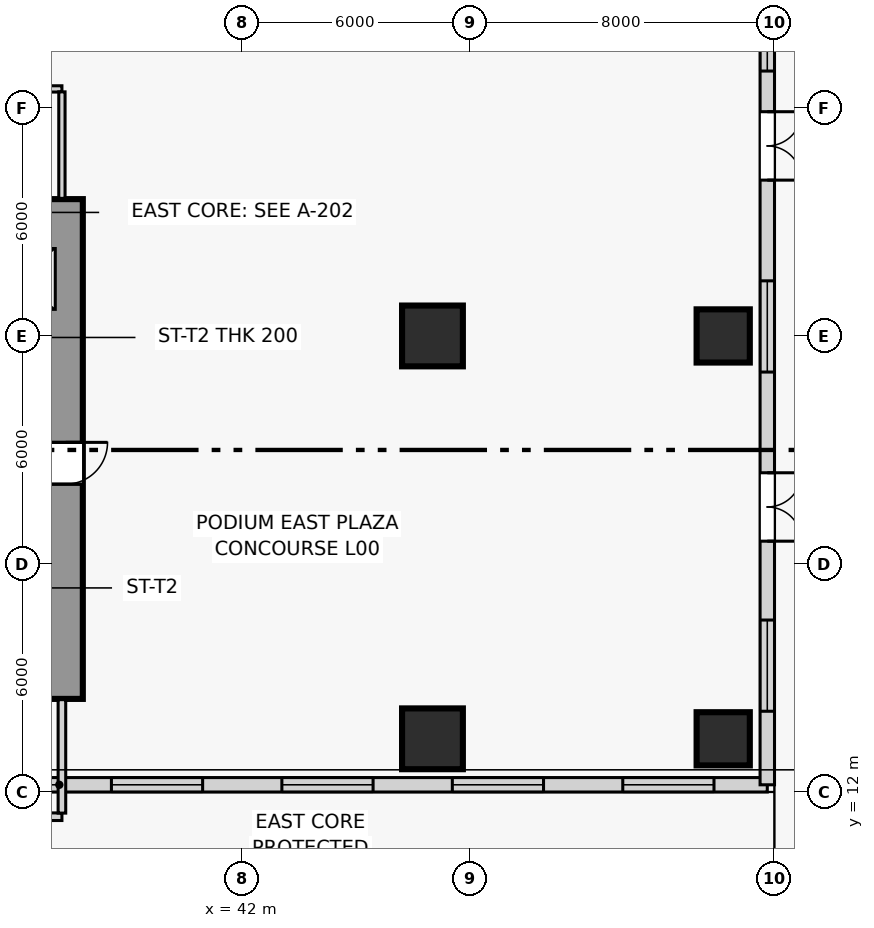
"""IFC4 building model, lengths in metres.
Left out: names, types, materials, properties, quantities, classifications, styles, units other than length and angle.
Written with IfcOpenShell. Run it as: python <this file> out.ifc"""

import sys

from ifc_helpers import new_model, si_unit, direction, frame, frame_2d, origin, origin_2d, place, context, subcontext, project, spatial, rectangle, extrude, source, transform, mapped, element, fill, save


model = new_model("IFC4")
c1 = context("Model", 3, precision=1e-05, world=origin(), true_north=direction((0.0, 1.0)))
c2 = subcontext(c1, "Body", "Model", "MODEL_VIEW")
j1 = project(units=[si_unit("LENGTHUNIT", "METRE"), si_unit("PLANEANGLEUNIT", "RADIAN")], contexts=[c1])
p1 = place(None, origin())
s1 = spatial("IfcSite", under=j1, at=p1, CompositionType="ELEMENT")
p2 = place(p1, origin())
s2 = spatial("IfcBuilding", under=s1, at=p2, CompositionType="ELEMENT")
p3 = place(p2, origin())
s3 = spatial("IfcBuildingStorey", under=s2, at=p3, CompositionType="ELEMENT", Elevation=0.0)
p4 = place(p3, frame((37.35, 14.45, 0.0), z_axis=(0.0, 0.0, 1.0), x_axis=(0.0, 1.0, 0.0)))
e1 = element("IfcWall", 1, at=p4, inside=s3, PredefinedType="SHEAR", context=c2, shape_type="SweptSolid", body=[
    extrude(rectangle(XDim=13.15, YDim=0.9, at=frame_2d((6.575, 0.0))), origin(), (0.0, 0.0, 1.0), 4.5),
])
p5 = place(p4, frame((5.65, 0.0, 0.0)))
e2 = element("IfcOpeningElement", 2, at=p5, cuts=e1, PredefinedType="OPENING", context=c2, shape_type="SweptSolid", body=[
    extrude(rectangle(XDim=1.1, YDim=2.2, at=frame_2d((0.55, 1.1))), frame((0.0, 0.46, 0.0), z_axis=(0.0, -1.0, 0.0), x_axis=(1.0, 0.0, 0.0)), (0.0, 0.0, 1.0), 0.92),
])
m1 = source(origin(), c2, "Body", "SweptSolid", [
    extrude(rectangle(XDim=1.6, YDim=1.6, at=origin_2d()), origin(), (0.0, 0.0, 1.0), 4.5),
])
for number, where, z_axis, x_axis in (
    (3, (47.0, 13.4, 0.0), (0.0, 0.0, 1.0), (1.0, 0.0, 0.0)),
    (4, (47.0, 24.0, 0.0), (0.0, 0.0, 1.0), (1.0, 0.0, 0.0)),
):
    element("IfcColumn", number, at=place(p3, frame(where, z_axis=z_axis, x_axis=x_axis)), inside=s3, PredefinedType="COLUMN", context=c2, shape_type="MappedRepresentation", body=[
        mapped(m1, transform((0.0, 0.0, 0.0), scale=1.0)),
    ])
m2 = source(origin(), c2, "Body", "SweptSolid", [
    extrude(rectangle(XDim=1.4, YDim=1.4, at=origin_2d()), origin(), (0.0, 0.0, 1.0), 4.5),
])
for number, where, z_axis, x_axis in (
    (5, (54.65, 13.4, 0.0), (0.0, 0.0, 1.0), (1.0, 0.0, 0.0)),
    (6, (54.65, 24.0, 0.0), (0.0, 0.0, 1.0), (1.0, 0.0, 0.0)),
):
    element("IfcColumn", number, at=place(p3, frame(where, z_axis=z_axis, x_axis=x_axis)), inside=s3, PredefinedType="COLUMN", context=c2, shape_type="MappedRepresentation", body=[
        mapped(m2, transform((0.0, 0.0, 0.0), scale=1.0)),
    ])
p6 = place(p3, frame((35.81, 12.19, 0.0), z_axis=(0.0, 0.0, 1.0), x_axis=(1.0, 0.0, 0.0)))
e7 = element("IfcWall", 7, at=p6, inside=s3, PredefinedType="SOLIDWALL", context=c2, shape_type="SweptSolid", body=[
    extrude(rectangle(XDim=20.0, YDim=0.38, at=frame_2d((10.0, 0.0))), origin(), (0.0, 0.0, 1.0), 4.16),
])
p7 = place(p6, frame((2.742, 0.0, 0.8)))
e8 = element("IfcOpeningElement", 8, at=p7, cuts=e7, PredefinedType="OPENING", context=c2, shape_type="SweptSolid", body=[
    extrude(rectangle(XDim=2.4, YDim=2.1, at=frame_2d((1.2, 1.05))), frame((0.0, 0.2, 0.0), z_axis=(0.0, -1.0, 0.0), x_axis=(1.0, 0.0, 0.0)), (0.0, 0.0, 1.0), 0.4),
])
p8 = place(p6, frame((7.228, 0.0, 0.8)))
e9 = element("IfcOpeningElement", 9, at=p8, cuts=e7, PredefinedType="OPENING", context=c2, shape_type="SweptSolid", body=[
    extrude(rectangle(XDim=2.4, YDim=2.1, at=frame_2d((1.2, 1.05))), frame((0.0, 0.2, 0.0), z_axis=(0.0, -1.0, 0.0), x_axis=(1.0, 0.0, 0.0)), (0.0, 0.0, 1.0), 0.4),
])
p9 = place(p6, frame((11.712, 0.0, 0.8)))
e10 = element("IfcOpeningElement", 10, at=p9, cuts=e7, PredefinedType="OPENING", context=c2, shape_type="SweptSolid", body=[
    extrude(rectangle(XDim=2.4, YDim=2.1, at=frame_2d((1.2, 1.05))), frame((0.0, 0.2, 0.0), z_axis=(0.0, -1.0, 0.0), x_axis=(1.0, 0.0, 0.0)), (0.0, 0.0, 1.0), 0.4),
])
p10 = place(p6, frame((16.198, 0.0, 0.8)))
e11 = element("IfcOpeningElement", 11, at=p10, cuts=e7, PredefinedType="OPENING", context=c2, shape_type="SweptSolid", body=[
    extrude(rectangle(XDim=2.4, YDim=2.1, at=frame_2d((1.2, 1.05))), frame((0.0, 0.2, 0.0), z_axis=(0.0, -1.0, 0.0), x_axis=(1.0, 0.0, 0.0)), (0.0, 0.0, 1.0), 0.4),
])
p11 = place(p3, frame((55.81, 12.19, 0.0), z_axis=(0.0, 0.0, 1.0), x_axis=(0.0, 1.0, 0.0)))
e12 = element("IfcWall", 12, at=p11, inside=s3, PredefinedType="SOLIDWALL", context=c2, shape_type="SweptSolid", body=[
    extrude(rectangle(XDim=35.62, YDim=0.38, at=frame_2d((17.81, 0.0))), origin(), (0.0, 0.0, 1.0), 4.16),
])
p12 = place(p11, frame((1.935, 0.0, 0.8)))
e13 = element("IfcOpeningElement", 13, at=p12, cuts=e12, PredefinedType="OPENING", context=c2, shape_type="SweptSolid", body=[
    extrude(rectangle(XDim=2.4, YDim=2.1, at=frame_2d((1.2, 1.05))), frame((0.0, 0.2, 0.0), z_axis=(0.0, -1.0, 0.0), x_axis=(1.0, 0.0, 0.0)), (0.0, 0.0, 1.0), 0.4),
])
p13 = place(p11, frame((10.86, 0.0, 0.8)))
e14 = element("IfcOpeningElement", 14, at=p13, cuts=e12, PredefinedType="OPENING", context=c2, shape_type="SweptSolid", body=[
    extrude(rectangle(XDim=2.4, YDim=2.1, at=frame_2d((1.2, 1.05))), frame((0.0, 0.2, 0.0), z_axis=(0.0, -1.0, 0.0), x_axis=(1.0, 0.0, 0.0)), (0.0, 0.0, 1.0), 0.4),
])
p14 = place(p11, frame((18.78, 0.0, 0.8)))
e15 = element("IfcOpeningElement", 15, at=p14, cuts=e12, PredefinedType="OPENING", context=c2, shape_type="SweptSolid", body=[
    extrude(rectangle(XDim=2.4, YDim=2.1, at=frame_2d((1.2, 1.05))), frame((0.0, 0.2, 0.0), z_axis=(0.0, -1.0, 0.0), x_axis=(1.0, 0.0, 0.0)), (0.0, 0.0, 1.0), 0.4),
])
p15 = place(p11, frame((23.235, 0.0, 0.8)))
e16 = element("IfcOpeningElement", 16, at=p15, cuts=e12, PredefinedType="OPENING", context=c2, shape_type="SweptSolid", body=[
    extrude(rectangle(XDim=2.4, YDim=2.1, at=frame_2d((1.2, 1.05))), frame((0.0, 0.2, 0.0), z_axis=(0.0, -1.0, 0.0), x_axis=(1.0, 0.0, 0.0)), (0.0, 0.0, 1.0), 0.4),
])
p16 = place(p11, frame((27.565, 0.0, 0.8)))
e17 = element("IfcOpeningElement", 17, at=p16, cuts=e12, PredefinedType="OPENING", context=c2, shape_type="SweptSolid", body=[
    extrude(rectangle(XDim=2.4, YDim=2.1, at=frame_2d((1.2, 1.05))), frame((0.0, 0.2, 0.0), z_axis=(0.0, -1.0, 0.0), x_axis=(1.0, 0.0, 0.0)), (0.0, 0.0, 1.0), 0.4),
])
p17 = place(p11, frame((31.895, 0.0, 0.8)))
e18 = element("IfcOpeningElement", 18, at=p17, cuts=e12, PredefinedType="OPENING", context=c2, shape_type="SweptSolid", body=[
    extrude(rectangle(XDim=2.4, YDim=2.1, at=frame_2d((1.2, 1.05))), frame((0.0, 0.2, 0.0), z_axis=(0.0, -1.0, 0.0), x_axis=(1.0, 0.0, 0.0)), (0.0, 0.0, 1.0), 0.4),
])
p18 = place(p11, frame((6.41, 0.0, 0.0)))
e19 = element("IfcOpeningElement", 19, at=p18, cuts=e12, PredefinedType="OPENING", context=c2, shape_type="SweptSolid", body=[
    extrude(rectangle(XDim=1.8, YDim=2.4, at=frame_2d((0.9, 1.2))), frame((0.0, 0.2, 0.0), z_axis=(0.0, -1.0, 0.0), x_axis=(1.0, 0.0, 0.0)), (0.0, 0.0, 1.0), 0.4),
])
p19 = place(p11, frame((15.91, 0.0, 0.0)))
e20 = element("IfcOpeningElement", 20, at=p19, cuts=e12, PredefinedType="OPENING", context=c2, shape_type="SweptSolid", body=[
    extrude(rectangle(XDim=1.8, YDim=2.4, at=frame_2d((0.9, 1.2))), frame((0.0, 0.2, 0.0), z_axis=(0.0, -1.0, 0.0), x_axis=(1.0, 0.0, 0.0)), (0.0, 0.0, 1.0), 0.4),
])
p20 = place(p3, frame((31.05, 11.35, 0.0), z_axis=(0.0, 0.0, 1.0), x_axis=(1.0, 0.0, 0.0)))
e21 = element("IfcWall", 21, at=p20, inside=s3, PredefinedType="PARTITIONING", context=c2, shape_type="SweptSolid", body=[
    extrude(rectangle(XDim=6.2, YDim=0.2, at=frame_2d((3.1, 0.0))), origin(), (0.0, 0.0, 1.0), 4.16),
])
p21 = place(p20, frame((2.586, 0.0, 0.0)))
e22 = element("IfcOpeningElement", 22, at=p21, cuts=e21, PredefinedType="OPENING", context=c2, shape_type="SweptSolid", body=[
    extrude(rectangle(XDim=1.2, YDim=2.2, at=frame_2d((0.6, 1.1))), frame((0.0, 0.11, 0.0), z_axis=(0.0, -1.0, 0.0), x_axis=(1.0, 0.0, 0.0)), (0.0, 0.0, 1.0), 0.22),
])
p22 = place(p3, frame((37.25, 11.445, 0.0), z_axis=(0.0, 0.0, 1.0), x_axis=(0.0, 1.0, 0.0)))
e23 = element("IfcWall", 23, at=p22, inside=s3, PredefinedType="PARTITIONING", context=c2, shape_type="SweptSolid", body=[
    extrude(rectangle(XDim=2.985, YDim=0.2, at=frame_2d((1.492, 0.0))), origin(), (0.0, 0.0, 1.0), 4.16),
])
p23 = place(p3, frame((31.05, 30.5, 0.0), z_axis=(0.0, 0.0, 1.0), x_axis=(1.0, 0.0, 0.0)))
e24 = element("IfcWall", 24, at=p23, inside=s3, PredefinedType="PARTITIONING", context=c2, shape_type="SweptSolid", body=[
    extrude(rectangle(XDim=6.2, YDim=0.165, at=frame_2d((3.1, 0.0))), origin(), (0.0, 0.0, 1.0), 4.16),
])
p24 = place(p23, frame((2.5, 0.0, 0.0)))
e25 = element("IfcOpeningElement", 25, at=p24, cuts=e24, PredefinedType="OPENING", context=c2, shape_type="SweptSolid", body=[
    extrude(rectangle(XDim=1.2, YDim=2.2, at=frame_2d((0.6, 1.1))), frame((0.0, 0.093, 0.0), z_axis=(0.0, -1.0, 0.0), x_axis=(1.0, 0.0, 0.0)), (0.0, 0.0, 1.0), 0.185),
])
p25 = place(p3, frame((37.25, 27.62, 0.0), z_axis=(0.0, 0.0, 1.0), x_axis=(0.0, 1.0, 0.0)))
e26 = element("IfcWall", 26, at=p25, inside=s3, PredefinedType="PARTITIONING", context=c2, shape_type="SweptSolid", body=[
    extrude(rectangle(XDim=2.802, YDim=0.165, at=frame_2d((1.401, 0.0))), origin(), (0.0, 0.0, 1.0), 4.16),
])
m3 = source(origin(), c2, "Body", "SweptSolid", [
    extrude(rectangle(XDim=2.4, YDim=2.1, at=frame_2d((1.2, 1.05))), frame((0.0, 0.03, 0.0), z_axis=(0.0, -1.0, 0.0), x_axis=(1.0, 0.0, 0.0)), (0.0, 0.0, 1.0), 0.06),
])
p26 = place(p7, origin())
e27 = element("IfcWindow", 27, at=p26, inside=s3, PartitioningType="SINGLE_PANEL", PredefinedType="WINDOW", context=c2, shape_type="MappedRepresentation", body=[
    mapped(m3, transform((0.0, 0.0, 0.0), scale=1.0)),
])
fill(e8, e27)
p27 = place(p8, origin())
e28 = element("IfcWindow", 28, at=p27, inside=s3, PartitioningType="SINGLE_PANEL", PredefinedType="WINDOW", context=c2, shape_type="MappedRepresentation", body=[
    mapped(m3, transform((0.0, 0.0, 0.0), scale=1.0)),
])
fill(e9, e28)
p28 = place(p9, origin())
e29 = element("IfcWindow", 29, at=p28, inside=s3, PartitioningType="SINGLE_PANEL", PredefinedType="WINDOW", context=c2, shape_type="MappedRepresentation", body=[
    mapped(m3, transform((0.0, 0.0, 0.0), scale=1.0)),
])
fill(e10, e29)
p29 = place(p10, origin())
e30 = element("IfcWindow", 30, at=p29, inside=s3, PartitioningType="SINGLE_PANEL", PredefinedType="WINDOW", context=c2, shape_type="MappedRepresentation", body=[
    mapped(m3, transform((0.0, 0.0, 0.0), scale=1.0)),
])
fill(e11, e30)
p30 = place(p12, origin())
e31 = element("IfcWindow", 31, at=p30, inside=s3, PartitioningType="SINGLE_PANEL", PredefinedType="WINDOW", context=c2, shape_type="MappedRepresentation", body=[
    mapped(m3, transform((0.0, 0.0, 0.0), scale=1.0)),
])
fill(e13, e31)
p31 = place(p13, origin())
e32 = element("IfcWindow", 32, at=p31, inside=s3, PartitioningType="SINGLE_PANEL", PredefinedType="WINDOW", context=c2, shape_type="MappedRepresentation", body=[
    mapped(m3, transform((0.0, 0.0, 0.0), scale=1.0)),
])
fill(e14, e32)
p32 = place(p14, origin())
e33 = element("IfcWindow", 33, at=p32, inside=s3, PartitioningType="SINGLE_PANEL", PredefinedType="WINDOW", context=c2, shape_type="MappedRepresentation", body=[
    mapped(m3, transform((0.0, 0.0, 0.0), scale=1.0)),
])
fill(e15, e33)
m4 = source(origin(), c2, "Body", "SweptSolid", [
    extrude(rectangle(XDim=1.8, YDim=2.4, at=frame_2d((0.9, 1.2))), frame((0.0, 0.025, 0.0), z_axis=(0.0, -1.0, 0.0), x_axis=(1.0, 0.0, 0.0)), (0.0, 0.0, 1.0), 0.05),
])
p33 = place(p18, frame((1.8, 0.0, 0.0), z_axis=(0.0, 0.0, 1.0), x_axis=(-1.0, 0.0, 0.0)))
e34 = element("IfcDoor", 34, at=p33, inside=s3, OperationType="DOUBLE_DOOR_SINGLE_SWING", PredefinedType="DOOR", context=c2, shape_type="MappedRepresentation", body=[
    mapped(m4, transform((0.0, 0.0, 0.0), scale=1.0)),
])
fill(e19, e34)
p34 = place(p19, frame((1.8, 0.0, 0.0), z_axis=(0.0, 0.0, 1.0), x_axis=(-1.0, 0.0, 0.0)))
e35 = element("IfcDoor", 35, at=p34, inside=s3, OperationType="DOUBLE_DOOR_SINGLE_SWING", PredefinedType="DOOR", context=c2, shape_type="MappedRepresentation", body=[
    mapped(m4, transform((0.0, 0.0, 0.0), scale=1.0)),
])
fill(e20, e35)
m5 = source(origin(), c2, "Body", "SweptSolid", [
    extrude(rectangle(XDim=1.1, YDim=2.2, at=frame_2d((0.55, 1.1))), frame((0.0, 0.025, 0.0), z_axis=(0.0, -1.0, 0.0), x_axis=(1.0, 0.0, 0.0)), (0.0, 0.0, 1.0), 0.05),
])
p35 = place(p5, frame((1.1, 0.0, 0.0), z_axis=(0.0, 0.0, 1.0), x_axis=(-1.0, 0.0, 0.0)))
e36 = element("IfcDoor", 36, at=p35, inside=s3, OperationType="SINGLE_SWING_LEFT", PredefinedType="DOOR", context=c2, shape_type="MappedRepresentation", body=[
    mapped(m5, transform((0.0, 0.0, 0.0), scale=1.0)),
])
fill(e2, e36)
save(model, sys.argv[1])
